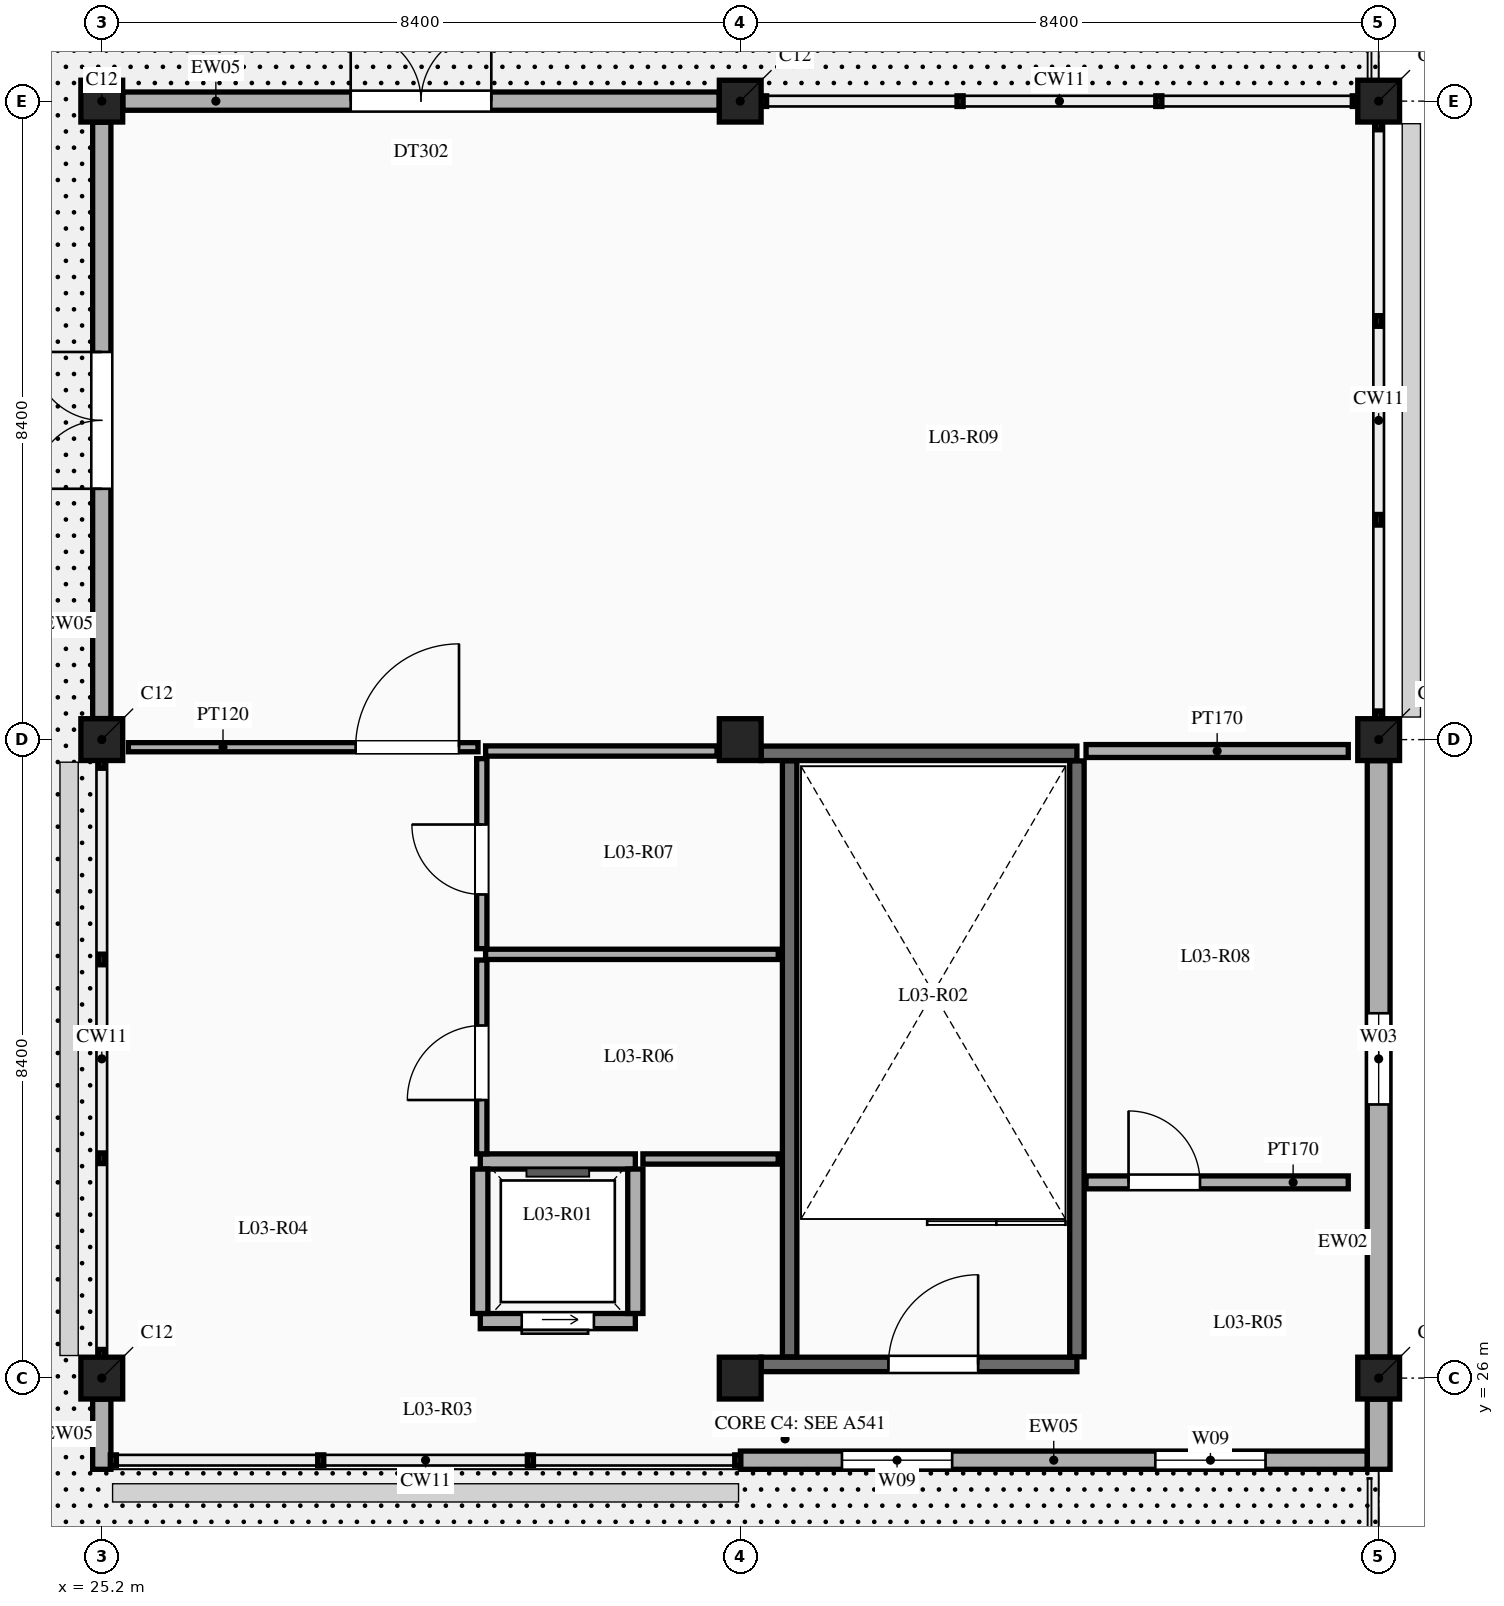
"""IFC4 building model, lengths in metres.
Left out: names, types, materials, properties, quantities, classifications, styles, units other than length and angle.
Written with IfcOpenShell. Run it as: python <this file> out.ifc"""

import sys

from ifc_helpers import new_model, si_unit, direction, frame, frame_2d, origin, origin_2d, place, context, subcontext, project, spatial, rectangle, extrude, element, fill, save


model = new_model("IFC4")
c1 = context("Model", 3, precision=1e-05, world=origin(), true_north=direction((0.0, 1.0)))
c2 = subcontext(c1, "Body", "Model", "MODEL_VIEW")
j1 = project(units=[si_unit("LENGTHUNIT", "METRE"), si_unit("PLANEANGLEUNIT", "RADIAN")], contexts=[c1])
p1 = place(None, origin())
s1 = spatial("IfcSite", under=j1, at=p1, CompositionType="ELEMENT")
p2 = place(p1, origin())
s2 = spatial("IfcBuilding", under=s1, at=p2, CompositionType="ELEMENT")
p3 = place(p2, frame((0.0, 0.0, 15.0)))
s3 = spatial("IfcBuildingStorey", under=s2, at=p3, CompositionType="ELEMENT", Elevation=15.0)
for number, where, z_axis, x_axis in (
    (1, (25.2, 26.0, 0.0), (0.0, 0.0, 1.0), (1.0, 0.0, 0.0)),
    (2, (25.2, 34.4, 0.0), (0.0, 0.0, 1.0), (1.0, 0.0, 0.0)),
    (3, (25.2, 42.8, 0.0), (0.0, 0.0, 1.0), (1.0, 0.0, 0.0)),
    (4, (33.6, 26.0, 0.0), (0.0, 0.0, 1.0), (1.0, 0.0, 0.0)),
    (5, (33.6, 34.4, 0.0), (0.0, 0.0, 1.0), (1.0, 0.0, 0.0)),
    (6, (33.6, 42.8, 0.0), (0.0, 0.0, 1.0), (1.0, 0.0, 0.0)),
    (7, (42.0, 26.0, 0.0), (0.0, 0.0, 1.0), (1.0, 0.0, 0.0)),
    (8, (42.0, 34.4, 0.0), (0.0, 0.0, 1.0), (1.0, 0.0, 0.0)),
    (9, (42.0, 42.8, 0.0), (0.0, 0.0, 1.0), (1.0, 0.0, 0.0)),
):
    element("IfcColumn", number, at=place(p3, frame(where, z_axis=z_axis, x_axis=x_axis)), inside=s3, PredefinedType="COLUMN", context=c2, shape_type="SweptSolid", body=[
        extrude(rectangle(XDim=0.55, YDim=0.55, at=origin_2d()), origin(), (0.0, 0.0, 1.0), 4.5),
    ])
p4 = place(p3, frame((25.2, 24.8, 0.0), z_axis=(0.0, 0.0, 1.0), x_axis=(0.0, 1.0, 0.0)))
e10 = element("IfcWall", 10, at=p4, inside=s3, PredefinedType="SOLIDWALL", context=c2, shape_type="SweptSolid", body=[
    extrude(rectangle(XDim=0.923, YDim=0.24, at=frame_2d((0.461, 0.0))), origin(), (0.0, 0.0, 1.0), 3.55),
])
p5 = place(p3, frame((42.0, 24.8, 0.0), z_axis=(0.0, 0.0, 1.0), x_axis=(0.0, 1.0, 0.0)))
e11 = element("IfcWall", 11, at=p5, inside=s3, PredefinedType="SOLIDWALL", context=c2, shape_type="SweptSolid", body=[
    extrude(rectangle(XDim=0.923, YDim=0.3, at=frame_2d((0.461, 0.0))), origin(), (0.0, 0.0, 1.0), 3.55),
])
p6 = place(p3, frame((25.477, 42.8, 0.0), z_axis=(0.0, 0.0, 1.0), x_axis=(1.0, 0.0, 0.0)))
e12 = element("IfcWall", 12, at=p6, inside=s3, PredefinedType="SOLIDWALL", context=c2, shape_type="SweptSolid", body=[
    extrude(rectangle(XDim=7.846, YDim=0.24, at=frame_2d((3.923, 0.0))), origin(), (0.0, 0.0, 1.0), 3.55),
])
p7 = place(p6, frame((2.998, 0.0, 0.0)))
e13 = element("IfcOpeningElement", 13, at=p7, cuts=e12, PredefinedType="OPENING", context=c2, shape_type="SweptSolid", body=[
    extrude(rectangle(XDim=1.85, YDim=2.2, at=frame_2d((0.925, 1.1))), frame((0.0, 0.13, 0.0), z_axis=(0.0, -1.0, 0.0), x_axis=(1.0, 0.0, 0.0)), (0.0, 0.0, 1.0), 0.26),
])
p8 = place(p3, frame((33.602, 24.92, 0.0), z_axis=(0.0, 0.0, 1.0), x_axis=(1.0, 0.0, 0.0)))
e14 = element("IfcWall", 14, at=p8, inside=s3, PredefinedType="SOLIDWALL", context=c2, shape_type="SweptSolid", body=[
    extrude(rectangle(XDim=8.246, YDim=0.24, at=frame_2d((4.123, 0.0))), origin(), (0.0, 0.0, 1.0), 3.55),
])
p9 = place(p8, frame((1.336, 0.0, 0.9)))
e15 = element("IfcOpeningElement", 15, at=p9, cuts=e14, PredefinedType="OPENING", context=c2, shape_type="SweptSolid", body=[
    extrude(rectangle(XDim=1.45, YDim=1.8, at=frame_2d((0.725, 0.9))), frame((0.0, 0.13, 0.0), z_axis=(0.0, -1.0, 0.0), x_axis=(1.0, 0.0, 0.0)), (0.0, 0.0, 1.0), 0.26),
])
p10 = place(p8, frame((5.459, 0.0, 0.9)))
e16 = element("IfcOpeningElement", 16, at=p10, cuts=e14, PredefinedType="OPENING", context=c2, shape_type="SweptSolid", body=[
    extrude(rectangle(XDim=1.45, YDim=1.8, at=frame_2d((0.725, 0.9))), frame((0.0, 0.13, 0.0), z_axis=(0.0, -1.0, 0.0), x_axis=(1.0, 0.0, 0.0)), (0.0, 0.0, 1.0), 0.26),
])
p11 = place(p3, frame((42.0, 26.277, 0.0), z_axis=(0.0, 0.0, 1.0), x_axis=(0.0, 1.0, 0.0)))
e17 = element("IfcWall", 17, at=p11, inside=s3, PredefinedType="SOLIDWALL", context=c2, shape_type="SweptSolid", body=[
    extrude(rectangle(XDim=7.846, YDim=0.3, at=frame_2d((3.923, 0.0))), origin(), (0.0, 0.0, 1.0), 3.55),
])
p12 = place(p11, frame((3.323, 0.0, 1.1)))
e18 = element("IfcOpeningElement", 18, at=p12, cuts=e17, PredefinedType="OPENING", context=c2, shape_type="SweptSolid", body=[
    extrude(rectangle(XDim=1.2, YDim=1.2, at=frame_2d((0.6, 0.6))), frame((0.0, 0.16, 0.0), z_axis=(0.0, -1.0, 0.0), x_axis=(1.0, 0.0, 0.0)), (0.0, 0.0, 1.0), 0.32),
])
p13 = place(p3, frame((25.2, 34.677, 0.0), z_axis=(0.0, 0.0, 1.0), x_axis=(0.0, 1.0, 0.0)))
e19 = element("IfcWall", 19, at=p13, inside=s3, PredefinedType="SOLIDWALL", context=c2, shape_type="SweptSolid", body=[
    extrude(rectangle(XDim=7.846, YDim=0.24, at=frame_2d((3.923, 0.0))), origin(), (0.0, 0.0, 1.0), 3.55),
])
p14 = place(p13, frame((3.023, 0.0, 0.0)))
e20 = element("IfcOpeningElement", 20, at=p14, cuts=e19, PredefinedType="OPENING", context=c2, shape_type="SweptSolid", body=[
    extrude(rectangle(XDim=1.8, YDim=2.2, at=frame_2d((0.9, 1.1))), frame((0.0, 0.13, 0.0), z_axis=(0.0, -1.0, 0.0), x_axis=(1.0, 0.0, 0.0)), (0.0, 0.0, 1.0), 0.26),
])
p15 = place(p3, frame((30.18, 26.75, 0.0), z_axis=(0.0, 0.0, 1.0), x_axis=(1.0, 0.0, 0.0)))
e21 = element("IfcWall", 21, at=p15, inside=s3, PredefinedType="SOLIDWALL", context=c2, shape_type="SweptSolid", body=[
    extrude(rectangle(XDim=2.04, YDim=0.2, at=frame_2d((1.02, 0.0))), origin(), (0.0, 0.0, 1.0), 4.25),
])
p16 = place(p15, frame((0.545, 0.0, 0.0)))
e22 = element("IfcOpeningElement", 22, at=p16, cuts=e21, PredefinedType="OPENING", context=c2, shape_type="SweptSolid", body=[
    extrude(rectangle(XDim=0.95, YDim=2.15, at=frame_2d((0.475, 1.075))), frame((0.0, 0.11, 0.0), z_axis=(0.0, -1.0, 0.0), x_axis=(1.0, 0.0, 0.0)), (0.0, 0.0, 1.0), 0.22),
])
p17 = place(p3, frame((30.18, 28.85, 0.0), z_axis=(0.0, 0.0, 1.0), x_axis=(1.0, 0.0, 0.0)))
e23 = element("IfcWall", 23, at=p17, inside=s3, PredefinedType="SOLIDWALL", context=c2, shape_type="SweptSolid", body=[
    extrude(rectangle(XDim=2.04, YDim=0.2, at=frame_2d((1.02, 0.0))), origin(), (0.0, 0.0, 1.0), 4.25),
])
for number, where, z_axis, x_axis in (
    (24, (30.18, 26.85, 0.0), (0.0, 0.0, 1.0), (0.0, 1.0, 0.0)),
    (25, (32.22, 26.85, 0.0), (0.0, 0.0, 1.0), (0.0, 1.0, 0.0)),
):
    element("IfcWall", number, at=place(p3, frame(where, z_axis=z_axis, x_axis=x_axis)), inside=s3, PredefinedType="SOLIDWALL", context=c2, shape_type="SweptSolid", body=[
        extrude(rectangle(XDim=1.9, YDim=0.2, at=frame_2d((0.95, 0.0))), origin(), (0.0, 0.0, 1.0), 4.25),
    ])
p18 = place(p3, frame((33.875, 26.18, 0.0), z_axis=(0.0, 0.0, 1.0), x_axis=(1.0, 0.0, 0.0)))
e26 = element("IfcWall", 26, at=p18, inside=s3, PredefinedType="SOLIDWALL", context=c2, shape_type="SweptSolid", body=[
    extrude(rectangle(XDim=4.155, YDim=0.19, at=frame_2d((2.078, 0.0))), origin(), (0.0, 0.0, 1.0), 4.25),
])
p19 = place(p18, frame((1.675, 0.0, 0.0)))
e27 = element("IfcOpeningElement", 27, at=p19, cuts=e26, PredefinedType="OPENING", context=c2, shape_type="SweptSolid", body=[
    extrude(rectangle(XDim=1.18, YDim=2.15, at=frame_2d((0.59, 1.075))), frame((0.0, 0.105, 0.0), z_axis=(0.0, -1.0, 0.0), x_axis=(1.0, 0.0, 0.0)), (0.0, 0.0, 1.0), 0.21),
])
p20 = place(p3, frame((33.875, 34.22, 0.0), z_axis=(0.0, 0.0, 1.0), x_axis=(1.0, 0.0, 0.0)))
e28 = element("IfcWall", 28, at=p20, inside=s3, PredefinedType="SOLIDWALL", context=c2, shape_type="SweptSolid", body=[
    extrude(rectangle(XDim=4.155, YDim=0.19, at=frame_2d((2.078, 0.0))), origin(), (0.0, 0.0, 1.0), 4.25),
])
for number, where, z_axis, x_axis in (
    (29, (34.25, 26.28, 0.0), (0.0, 0.0, 1.0), (0.0, 1.0, 0.0)),
    (30, (38.03, 26.28, 0.0), (0.0, 0.0, 1.0), (0.0, 1.0, 0.0)),
):
    element("IfcWall", number, at=place(p3, frame(where, z_axis=z_axis, x_axis=x_axis)), inside=s3, PredefinedType="SOLIDWALL", context=c2, shape_type="SweptSolid", body=[
        extrude(rectangle(XDim=7.84, YDim=0.19, at=frame_2d((3.92, 0.0))), origin(), (0.0, 0.0, 1.0), 4.25),
    ])
p21 = place(p3, frame((30.2, 28.95, 0.0), z_axis=(0.0, 0.0, 1.0), x_axis=(0.0, 1.0, 0.0)))
e31 = element("IfcWall", 31, at=p21, inside=s3, PredefinedType="PARTITIONING", context=c2, shape_type="SweptSolid", body=[
    extrude(rectangle(XDim=2.55, YDim=0.135, at=frame_2d((1.275, 0.0))), origin(), (0.0, 0.0, 1.0), 3.45),
])
p22 = place(p21, frame((0.708, 0.0, 0.0)))
e32 = element("IfcOpeningElement", 32, at=p22, cuts=e31, PredefinedType="OPENING", context=c2, shape_type="SweptSolid", body=[
    extrude(rectangle(XDim=0.98, YDim=2.15, at=frame_2d((0.49, 1.075))), frame((0.0, 0.077, 0.0), z_axis=(0.0, -1.0, 0.0), x_axis=(1.0, 0.0, 0.0)), (0.0, 0.0, 1.0), 0.155),
])
p23 = place(p3, frame((30.2, 31.65, 0.0), z_axis=(0.0, 0.0, 1.0), x_axis=(0.0, 1.0, 0.0)))
e33 = element("IfcWall", 33, at=p23, inside=s3, PredefinedType="PARTITIONING", context=c2, shape_type="SweptSolid", body=[
    extrude(rectangle(XDim=2.5, YDim=0.135, at=frame_2d((1.25, 0.0))), origin(), (0.0, 0.0, 1.0), 3.45),
])
p24 = place(p23, frame((0.713, 0.0, 0.0)))
e34 = element("IfcOpeningElement", 34, at=p24, cuts=e33, PredefinedType="OPENING", context=c2, shape_type="SweptSolid", body=[
    extrude(rectangle(XDim=0.92, YDim=2.12, at=frame_2d((0.46, 1.06))), frame((0.0, 0.077, 0.0), z_axis=(0.0, -1.0, 0.0), x_axis=(1.0, 0.0, 0.0)), (0.0, 0.0, 1.0), 0.155),
])
p25 = place(p3, frame((25.55, 34.3, 0.0), z_axis=(0.0, 0.0, 1.0), x_axis=(1.0, 0.0, 0.0)))
e35 = element("IfcWall", 35, at=p25, inside=s3, PredefinedType="PARTITIONING", context=c2, shape_type="SweptSolid", body=[
    extrude(rectangle(XDim=4.6, YDim=0.12, at=frame_2d((2.3, 0.0))), origin(), (0.0, 0.0, 1.0), 3.45),
])
p26 = place(p25, frame((2.99, 0.0, 0.0)))
e36 = element("IfcOpeningElement", 36, at=p26, cuts=e35, PredefinedType="OPENING", context=c2, shape_type="SweptSolid", body=[
    extrude(rectangle(XDim=1.36, YDim=2.3, at=frame_2d((0.68, 1.15))), frame((0.0, 0.07, 0.0), z_axis=(0.0, -1.0, 0.0), x_axis=(1.0, 0.0, 0.0)), (0.0, 0.0, 1.0), 0.14),
])
p27 = place(p3, frame((38.15, 28.575, 0.0), z_axis=(0.0, 0.0, 1.0), x_axis=(1.0, 0.0, 0.0)))
e37 = element("IfcWall", 37, at=p27, inside=s3, PredefinedType="PARTITIONING", context=c2, shape_type="SweptSolid", body=[
    extrude(rectangle(XDim=3.45, YDim=0.17, at=frame_2d((1.725, 0.0))), origin(), (0.0, 0.0, 1.0), 3.45),
])
p28 = place(p27, frame((0.559, 0.0, 0.0)))
e38 = element("IfcOpeningElement", 38, at=p28, cuts=e37, PredefinedType="OPENING", context=c2, shape_type="SweptSolid", body=[
    extrude(rectangle(XDim=0.94, YDim=2.1, at=frame_2d((0.47, 1.05))), frame((0.0, 0.095, 0.0), z_axis=(0.0, -1.0, 0.0), x_axis=(1.0, 0.0, 0.0)), (0.0, 0.0, 1.0), 0.19),
])
p29 = place(p3, frame((30.25, 31.575, 0.0), z_axis=(0.0, 0.0, 1.0), x_axis=(1.0, 0.0, 0.0)))
e39 = element("IfcWall", 39, at=p29, inside=s3, PredefinedType="PARTITIONING", context=c2, shape_type="SweptSolid", body=[
    extrude(rectangle(XDim=3.85, YDim=0.135, at=frame_2d((1.925, 0.0))), origin(), (0.0, 0.0, 1.0), 3.45),
])
p30 = place(p3, frame((30.25, 34.25, 0.0), z_axis=(0.0, 0.0, 1.0), x_axis=(1.0, 0.0, 0.0)))
e40 = element("IfcWall", 40, at=p30, inside=s3, PredefinedType="PARTITIONING", context=c2, shape_type="SweptSolid", body=[
    extrude(rectangle(XDim=3.045, YDim=0.135, at=frame_2d((1.522, 0.0))), origin(), (0.0, 0.0, 1.0), 3.45),
])
p31 = place(p3, frame((38.15, 34.25, 0.0), z_axis=(0.0, 0.0, 1.0), x_axis=(1.0, 0.0, 0.0)))
e41 = element("IfcWall", 41, at=p31, inside=s3, PredefinedType="PARTITIONING", context=c2, shape_type="SweptSolid", body=[
    extrude(rectangle(XDim=3.45, YDim=0.17, at=frame_2d((1.725, 0.0))), origin(), (0.0, 0.0, 1.0), 3.45),
])
p32 = place(p3, frame((32.32, 28.883, 0.0), z_axis=(0.0, 0.0, 1.0), x_axis=(1.0, 0.0, 0.0)))
e42 = element("IfcWall", 42, at=p32, inside=s3, PredefinedType="PARTITIONING", context=c2, shape_type="SweptSolid", body=[
    extrude(rectangle(XDim=1.78, YDim=0.135, at=frame_2d((0.89, 0.0))), origin(), (0.0, 0.0, 1.0), 3.45),
])
p33 = place(p7, origin())
e43 = element("IfcDoor", 43, at=p33, inside=s3, OperationType="DOUBLE_DOOR_SINGLE_SWING", PredefinedType="DOOR", context=c2, shape_type="SweptSolid", body=[
    extrude(rectangle(XDim=1.85, YDim=2.2, at=frame_2d((0.925, 1.1))), frame((0.0, 0.025, 0.0), z_axis=(0.0, -1.0, 0.0), x_axis=(1.0, 0.0, 0.0)), (0.0, 0.0, 1.0), 0.05),
])
fill(e13, e43)
p34 = place(p9, origin())
e44 = element("IfcWindow", 44, at=p34, inside=s3, PartitioningType="DOUBLE_PANEL_HORIZONTAL", PredefinedType="WINDOW", context=c2, shape_type="SweptSolid", body=[
    extrude(rectangle(XDim=1.45, YDim=1.8, at=frame_2d((0.725, 0.9))), frame((0.0, 0.03, 0.0), z_axis=(0.0, -1.0, 0.0), x_axis=(1.0, 0.0, 0.0)), (0.0, 0.0, 1.0), 0.06),
])
fill(e15, e44)
p35 = place(p10, origin())
e45 = element("IfcWindow", 45, at=p35, inside=s3, PartitioningType="DOUBLE_PANEL_HORIZONTAL", PredefinedType="WINDOW", context=c2, shape_type="SweptSolid", body=[
    extrude(rectangle(XDim=1.45, YDim=1.8, at=frame_2d((0.725, 0.9))), frame((0.0, 0.03, 0.0), z_axis=(0.0, -1.0, 0.0), x_axis=(1.0, 0.0, 0.0)), (0.0, 0.0, 1.0), 0.06),
])
fill(e16, e45)
p36 = place(p12, origin())
e46 = element("IfcWindow", 46, at=p36, inside=s3, PartitioningType="SINGLE_PANEL", PredefinedType="WINDOW", context=c2, shape_type="SweptSolid", body=[
    extrude(rectangle(XDim=1.2, YDim=1.2, at=frame_2d((0.6, 0.6))), frame((0.0, 0.03, 0.0), z_axis=(0.0, -1.0, 0.0), x_axis=(1.0, 0.0, 0.0)), (0.0, 0.0, 1.0), 0.06),
])
fill(e18, e46)
p37 = place(p14, origin())
e47 = element("IfcDoor", 47, at=p37, inside=s3, OperationType="DOUBLE_DOOR_SINGLE_SWING", PredefinedType="DOOR", context=c2, shape_type="SweptSolid", body=[
    extrude(rectangle(XDim=1.8, YDim=2.2, at=frame_2d((0.9, 1.1))), frame((0.0, 0.025, 0.0), z_axis=(0.0, -1.0, 0.0), x_axis=(1.0, 0.0, 0.0)), (0.0, 0.0, 1.0), 0.05),
])
fill(e20, e47)
p38 = place(p16, frame((0.95, 0.0, 0.0), z_axis=(0.0, 0.0, 1.0), x_axis=(-1.0, 0.0, 0.0)))
e48 = element("IfcDoor", 48, at=p38, inside=s3, OperationType="SLIDING_TO_LEFT", PredefinedType="DOOR", context=c2, shape_type="SweptSolid", body=[
    extrude(rectangle(XDim=0.95, YDim=2.15, at=frame_2d((0.475, 1.075))), frame((0.0, 0.025, 0.0), z_axis=(0.0, -1.0, 0.0), x_axis=(1.0, 0.0, 0.0)), (0.0, 0.0, 1.0), 0.05),
])
fill(e22, e48)
p39 = place(p19, origin())
e49 = element("IfcDoor", 49, at=p39, inside=s3, OperationType="SINGLE_SWING_RIGHT", PredefinedType="DOOR", context=c2, shape_type="SweptSolid", body=[
    extrude(rectangle(XDim=1.18, YDim=2.15, at=frame_2d((0.59, 1.075))), frame((0.0, 0.025, 0.0), z_axis=(0.0, -1.0, 0.0), x_axis=(1.0, 0.0, 0.0)), (0.0, 0.0, 1.0), 0.05),
])
fill(e27, e49)
p40 = place(p22, origin())
e50 = element("IfcDoor", 50, at=p40, inside=s3, OperationType="SINGLE_SWING_LEFT", PredefinedType="DOOR", context=c2, shape_type="SweptSolid", body=[
    extrude(rectangle(XDim=0.98, YDim=2.15, at=frame_2d((0.49, 1.075))), frame((0.0, 0.025, 0.0), z_axis=(0.0, -1.0, 0.0), x_axis=(1.0, 0.0, 0.0)), (0.0, 0.0, 1.0), 0.05),
])
fill(e32, e50)
p41 = place(p24, origin())
e51 = element("IfcDoor", 51, at=p41, inside=s3, OperationType="SINGLE_SWING_RIGHT", PredefinedType="DOOR", context=c2, shape_type="SweptSolid", body=[
    extrude(rectangle(XDim=0.92, YDim=2.12, at=frame_2d((0.46, 1.06))), frame((0.0, 0.025, 0.0), z_axis=(0.0, -1.0, 0.0), x_axis=(1.0, 0.0, 0.0)), (0.0, 0.0, 1.0), 0.05),
])
fill(e34, e51)
p42 = place(p28, origin())
e52 = element("IfcDoor", 52, at=p42, inside=s3, OperationType="SINGLE_SWING_LEFT", PredefinedType="DOOR", context=c2, shape_type="SweptSolid", body=[
    extrude(rectangle(XDim=0.94, YDim=2.1, at=frame_2d((0.47, 1.05))), frame((0.0, 0.025, 0.0), z_axis=(0.0, -1.0, 0.0), x_axis=(1.0, 0.0, 0.0)), (0.0, 0.0, 1.0), 0.05),
])
fill(e38, e52)
p43 = place(p26, origin())
e53 = element("IfcDoor", 53, at=p43, inside=s3, OperationType="SINGLE_SWING_RIGHT", PredefinedType="DOOR", context=c2, shape_type="SweptSolid", body=[
    extrude(rectangle(XDim=1.36, YDim=2.3, at=frame_2d((0.68, 1.15))), frame((0.0, 0.025, 0.0), z_axis=(0.0, -1.0, 0.0), x_axis=(1.0, 0.0, 0.0)), (0.0, 0.0, 1.0), 0.05),
])
fill(e36, e53)
save(model, sys.argv[1])
